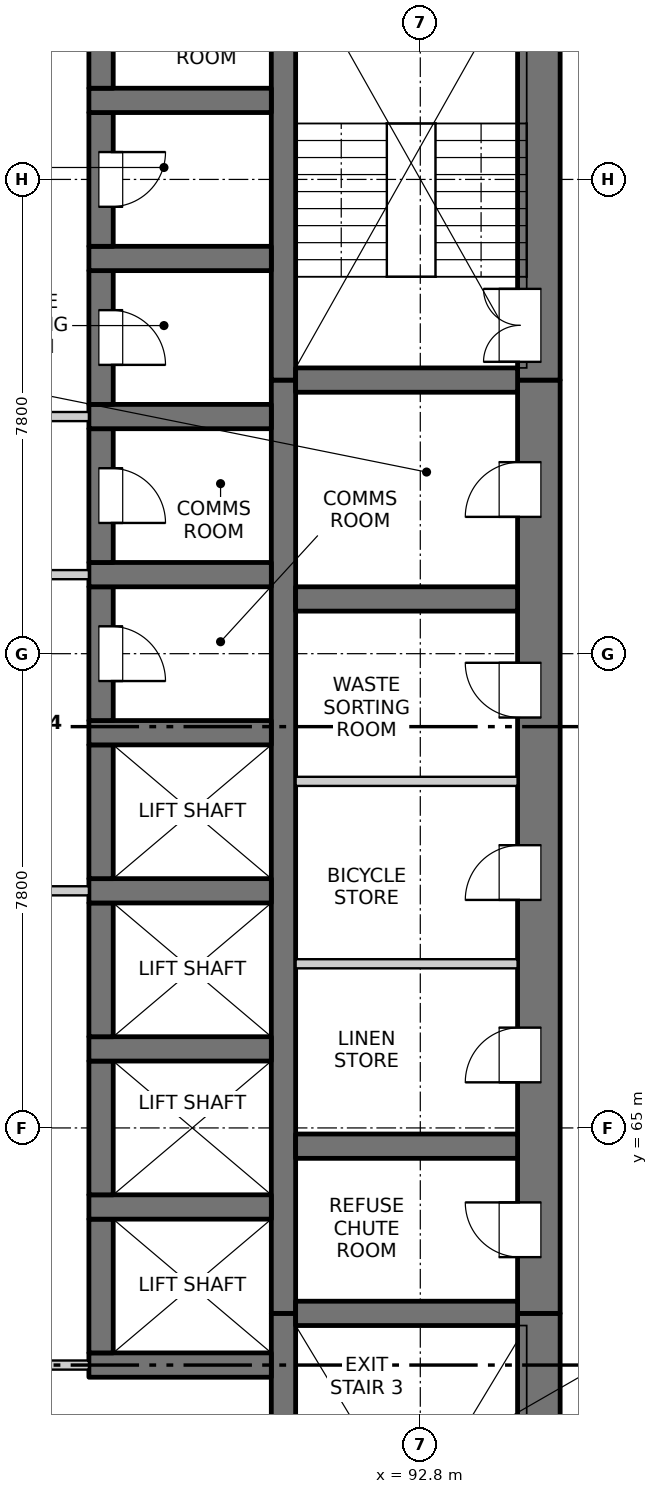
"""IFC4 building model, lengths in metres.
Left out: names, types, materials, properties, quantities, classifications, styles, units other than length and angle.
Written with IfcOpenShell. Run it as: python <this file> out.ifc"""

import sys

from ifc_helpers import new_model, si_unit, direction, frame, frame_2d, origin, place, context, subcontext, project, spatial, rectangle, extrude, element, fill, save


model = new_model("IFC4")
c1 = context("Model", 3, precision=1e-05, world=origin(), true_north=direction((0.0, 1.0)))
c2 = subcontext(c1, "Body", "Model", "MODEL_VIEW")
j1 = project(units=[si_unit("LENGTHUNIT", "METRE"), si_unit("PLANEANGLEUNIT", "RADIAN")], contexts=[c1])
p1 = place(None, origin())
s1 = spatial("IfcSite", under=j1, at=p1, CompositionType="ELEMENT")
p2 = place(p1, origin())
s2 = spatial("IfcBuilding", under=s1, at=p2, CompositionType="ELEMENT")
p3 = place(p2, frame((0.0, 0.0, 29.7)))
s3 = spatial("IfcBuildingStorey", under=s2, at=p3, CompositionType="ELEMENT", Elevation=29.7)
p4 = place(p3, frame((94.75, 54.9, -0.25), z_axis=(0.0, 0.0, 1.0), x_axis=(0.0, 1.0, 0.0)))
e1 = element("IfcWall", 1, at=p4, inside=s3, PredefinedType="SOLIDWALL", context=c2, shape_type="SweptSolid", body=[
    extrude(rectangle(XDim=7.05, YDim=0.7, at=frame_2d((3.525, 0.0))), origin(), (0.0, 0.0, 1.0), 3.4),
])
p5 = place(p4, frame((0.75, 0.0, 0.25)))
e2 = element("IfcOpeningElement", 2, at=p5, cuts=e1, PredefinedType="OPENING", context=c2, shape_type="SweptSolid", body=[
    extrude(rectangle(XDim=1.2, YDim=2.1, at=frame_2d((0.6, 1.05))), frame((0.0, 0.36, 0.0), z_axis=(0.0, -1.0, 0.0), x_axis=(1.0, 0.0, 0.0)), (0.0, 0.0, 1.0), 0.72),
])
p6 = place(p3, frame((94.75, 61.95, -0.25), z_axis=(0.0, 0.0, 1.0), x_axis=(0.0, 1.0, 0.0)))
e3 = element("IfcWall", 3, at=p6, inside=s3, PredefinedType="SOLIDWALL", context=c2, shape_type="SweptSolid", body=[
    extrude(rectangle(XDim=15.35, YDim=0.7, at=frame_2d((7.675, 0.0))), origin(), (0.0, 0.0, 1.0), 3.4),
])
p7 = place(p6, frame((0.925, 0.0, 0.25)))
e4 = element("IfcOpeningElement", 4, at=p7, cuts=e3, PredefinedType="OPENING", context=c2, shape_type="SweptSolid", body=[
    extrude(rectangle(XDim=0.9, YDim=2.1, at=frame_2d((0.45, 1.05))), frame((0.0, 0.36, 0.0), z_axis=(0.0, -1.0, 0.0), x_axis=(1.0, 0.0, 0.0)), (0.0, 0.0, 1.0), 0.72),
])
p8 = place(p6, frame((3.8, 0.0, 0.25)))
e5 = element("IfcOpeningElement", 5, at=p8, cuts=e3, PredefinedType="OPENING", context=c2, shape_type="SweptSolid", body=[
    extrude(rectangle(XDim=0.9, YDim=2.1, at=frame_2d((0.45, 1.05))), frame((0.0, 0.36, 0.0), z_axis=(0.0, -1.0, 0.0), x_axis=(1.0, 0.0, 0.0)), (0.0, 0.0, 1.0), 0.72),
])
p9 = place(p6, frame((6.8, 0.0, 0.25)))
e6 = element("IfcOpeningElement", 6, at=p9, cuts=e3, PredefinedType="OPENING", context=c2, shape_type="SweptSolid", body=[
    extrude(rectangle(XDim=0.9, YDim=2.1, at=frame_2d((0.45, 1.05))), frame((0.0, 0.36, 0.0), z_axis=(0.0, -1.0, 0.0), x_axis=(1.0, 0.0, 0.0)), (0.0, 0.0, 1.0), 0.72),
])
p10 = place(p6, frame((9.8, 0.0, 0.25)))
e7 = element("IfcOpeningElement", 7, at=p10, cuts=e3, PredefinedType="OPENING", context=c2, shape_type="SweptSolid", body=[
    extrude(rectangle(XDim=0.9, YDim=2.1, at=frame_2d((0.45, 1.05))), frame((0.0, 0.36, 0.0), z_axis=(0.0, -1.0, 0.0), x_axis=(1.0, 0.0, 0.0)), (0.0, 0.0, 1.0), 0.72),
])
p11 = place(p6, frame((13.1, 0.0, 0.25)))
e8 = element("IfcOpeningElement", 8, at=p11, cuts=e3, PredefinedType="OPENING", context=c2, shape_type="SweptSolid", body=[
    extrude(rectangle(XDim=0.9, YDim=2.1, at=frame_2d((0.45, 1.05))), frame((0.0, 0.36, 0.0), z_axis=(0.0, -1.0, 0.0), x_axis=(1.0, 0.0, 0.0)), (0.0, 0.0, 1.0), 0.72),
])
p12 = place(p3, frame((94.75, 77.3, -0.25), z_axis=(0.0, 0.0, 1.0), x_axis=(0.0, 1.0, 0.0)))
e9 = element("IfcWall", 9, at=p12, inside=s3, PredefinedType="SOLIDWALL", context=c2, shape_type="SweptSolid", body=[
    extrude(rectangle(XDim=7.55, YDim=0.7, at=frame_2d((3.775, 0.0))), origin(), (0.0, 0.0, 1.0), 3.4),
])
p13 = place(p12, frame((0.3, 0.0, 0.25)))
e10 = element("IfcOpeningElement", 10, at=p13, cuts=e9, PredefinedType="OPENING", context=c2, shape_type="SweptSolid", body=[
    extrude(rectangle(XDim=1.2, YDim=2.1, at=frame_2d((0.6, 1.05))), frame((0.0, 0.36, 0.0), z_axis=(0.0, -1.0, 0.0), x_axis=(1.0, 0.0, 0.0)), (0.0, 0.0, 1.0), 0.72),
])
p14 = place(p3, frame((90.55, 55.6, -0.25), z_axis=(0.0, 0.0, 1.0), x_axis=(0.0, 1.0, 0.0)))
e11 = element("IfcWall", 11, at=p14, inside=s3, PredefinedType="SOLIDWALL", context=c2, shape_type="SweptSolid", body=[
    extrude(rectangle(XDim=6.35, YDim=0.4, at=frame_2d((3.175, 0.0))), origin(), (0.0, 0.0, 1.0), 3.4),
])
p15 = place(p3, frame((90.55, 61.95, -0.25), z_axis=(0.0, 0.0, 1.0), x_axis=(0.0, 1.0, 0.0)))
e12 = element("IfcWall", 12, at=p15, inside=s3, PredefinedType="SOLIDWALL", context=c2, shape_type="SweptSolid", body=[
    extrude(rectangle(XDim=15.35, YDim=0.4, at=frame_2d((7.675, 0.0))), origin(), (0.0, 0.0, 1.0), 3.4),
])
p16 = place(p3, frame((90.55, 77.3, -0.25), z_axis=(0.0, 0.0, 1.0), x_axis=(0.0, 1.0, 0.0)))
e13 = element("IfcWall", 13, at=p16, inside=s3, PredefinedType="SOLIDWALL", context=c2, shape_type="SweptSolid", body=[
    extrude(rectangle(XDim=6.85, YDim=0.4, at=frame_2d((3.425, 0.0))), origin(), (0.0, 0.0, 1.0), 3.4),
])
p17 = place(p3, frame((87.35, 61.1, -0.25), z_axis=(0.0, 0.0, 1.0), x_axis=(1.0, 0.0, 0.0)))
e14 = element("IfcWall", 14, at=p17, inside=s3, PredefinedType="SOLIDWALL", context=c2, shape_type="SweptSolid", body=[
    extrude(rectangle(XDim=3.0, YDim=0.4, at=frame_2d((1.5, 0.0))), origin(), (0.0, 0.0, 1.0), 3.4),
])
p18 = place(p3, frame((87.55, 61.3, -0.25), z_axis=(0.0, 0.0, 1.0), x_axis=(0.0, 1.0, 0.0)))
e15 = element("IfcWall", 15, at=p18, inside=s3, PredefinedType="SOLIDWALL", context=c2, shape_type="SweptSolid", body=[
    extrude(rectangle(XDim=2.2, YDim=0.4, at=frame_2d((1.1, 0.0))), origin(), (0.0, 0.0, 1.0), 3.4),
])
p19 = place(p3, frame((87.35, 63.7, -0.25), z_axis=(0.0, 0.0, 1.0), x_axis=(1.0, 0.0, 0.0)))
e16 = element("IfcWall", 16, at=p19, inside=s3, PredefinedType="SOLIDWALL", context=c2, shape_type="SweptSolid", body=[
    extrude(rectangle(XDim=3.0, YDim=0.4, at=frame_2d((1.5, 0.0))), origin(), (0.0, 0.0, 1.0), 3.4),
])
p20 = place(p3, frame((87.55, 63.9, -0.25), z_axis=(0.0, 0.0, 1.0), x_axis=(0.0, 1.0, 0.0)))
e17 = element("IfcWall", 17, at=p20, inside=s3, PredefinedType="SOLIDWALL", context=c2, shape_type="SweptSolid", body=[
    extrude(rectangle(XDim=2.2, YDim=0.4, at=frame_2d((1.1, 0.0))), origin(), (0.0, 0.0, 1.0), 3.4),
])
p21 = place(p3, frame((87.35, 66.3, -0.25), z_axis=(0.0, 0.0, 1.0), x_axis=(1.0, 0.0, 0.0)))
e18 = element("IfcWall", 18, at=p21, inside=s3, PredefinedType="SOLIDWALL", context=c2, shape_type="SweptSolid", body=[
    extrude(rectangle(XDim=3.0, YDim=0.4, at=frame_2d((1.5, 0.0))), origin(), (0.0, 0.0, 1.0), 3.4),
])
p22 = place(p3, frame((87.55, 66.5, -0.25), z_axis=(0.0, 0.0, 1.0), x_axis=(0.0, 1.0, 0.0)))
e19 = element("IfcWall", 19, at=p22, inside=s3, PredefinedType="SOLIDWALL", context=c2, shape_type="SweptSolid", body=[
    extrude(rectangle(XDim=2.2, YDim=0.4, at=frame_2d((1.1, 0.0))), origin(), (0.0, 0.0, 1.0), 3.4),
])
p23 = place(p3, frame((87.35, 68.9, -0.25), z_axis=(0.0, 0.0, 1.0), x_axis=(1.0, 0.0, 0.0)))
e20 = element("IfcWall", 20, at=p23, inside=s3, PredefinedType="SOLIDWALL", context=c2, shape_type="SweptSolid", body=[
    extrude(rectangle(XDim=3.0, YDim=0.4, at=frame_2d((1.5, 0.0))), origin(), (0.0, 0.0, 1.0), 3.4),
])
p24 = place(p3, frame((87.55, 69.1, -0.25), z_axis=(0.0, 0.0, 1.0), x_axis=(0.0, 1.0, 0.0)))
e21 = element("IfcWall", 21, at=p24, inside=s3, PredefinedType="SOLIDWALL", context=c2, shape_type="SweptSolid", body=[
    extrude(rectangle(XDim=2.2, YDim=0.4, at=frame_2d((1.1, 0.0))), origin(), (0.0, 0.0, 1.0), 3.4),
])
p25 = place(p3, frame((87.35, 71.5, -0.25), z_axis=(0.0, 0.0, 1.0), x_axis=(1.0, 0.0, 0.0)))
e22 = element("IfcWall", 22, at=p25, inside=s3, PredefinedType="SOLIDWALL", context=c2, shape_type="SweptSolid", body=[
    extrude(rectangle(XDim=3.0, YDim=0.4, at=frame_2d((1.5, 0.0))), origin(), (0.0, 0.0, 1.0), 3.4),
])
p26 = place(p3, frame((87.55, 71.7, -0.25), z_axis=(0.0, 0.0, 1.0), x_axis=(0.0, 1.0, 0.0)))
e23 = element("IfcWall", 23, at=p26, inside=s3, PredefinedType="SOLIDWALL", context=c2, shape_type="SweptSolid", body=[
    extrude(rectangle(XDim=2.2, YDim=0.4, at=frame_2d((1.1, 0.0))), origin(), (0.0, 0.0, 1.0), 3.4),
])
p27 = place(p26, frame((0.65, 0.0, 0.25)))
e24 = element("IfcOpeningElement", 24, at=p27, cuts=e23, PredefinedType="OPENING", context=c2, shape_type="SweptSolid", body=[
    extrude(rectangle(XDim=0.9, YDim=2.1, at=frame_2d((0.45, 1.05))), frame((0.0, 0.21, 0.0), z_axis=(0.0, -1.0, 0.0), x_axis=(1.0, 0.0, 0.0)), (0.0, 0.0, 1.0), 0.42),
])
p28 = place(p3, frame((87.35, 74.1, -0.25), z_axis=(0.0, 0.0, 1.0), x_axis=(1.0, 0.0, 0.0)))
e25 = element("IfcWall", 25, at=p28, inside=s3, PredefinedType="SOLIDWALL", context=c2, shape_type="SweptSolid", body=[
    extrude(rectangle(XDim=3.0, YDim=0.4, at=frame_2d((1.5, 0.0))), origin(), (0.0, 0.0, 1.0), 3.4),
])
p29 = place(p3, frame((87.55, 74.3, -0.25), z_axis=(0.0, 0.0, 1.0), x_axis=(0.0, 1.0, 0.0)))
e26 = element("IfcWall", 26, at=p29, inside=s3, PredefinedType="SOLIDWALL", context=c2, shape_type="SweptSolid", body=[
    extrude(rectangle(XDim=2.2, YDim=0.4, at=frame_2d((1.1, 0.0))), origin(), (0.0, 0.0, 1.0), 3.4),
])
p30 = place(p29, frame((0.65, 0.0, 0.25)))
e27 = element("IfcOpeningElement", 27, at=p30, cuts=e26, PredefinedType="OPENING", context=c2, shape_type="SweptSolid", body=[
    extrude(rectangle(XDim=0.9, YDim=2.1, at=frame_2d((0.45, 1.05))), frame((0.0, 0.21, 0.0), z_axis=(0.0, -1.0, 0.0), x_axis=(1.0, 0.0, 0.0)), (0.0, 0.0, 1.0), 0.42),
])
p31 = place(p3, frame((87.35, 76.7, -0.25), z_axis=(0.0, 0.0, 1.0), x_axis=(1.0, 0.0, 0.0)))
e28 = element("IfcWall", 28, at=p31, inside=s3, PredefinedType="SOLIDWALL", context=c2, shape_type="SweptSolid", body=[
    extrude(rectangle(XDim=3.0, YDim=0.4, at=frame_2d((1.5, 0.0))), origin(), (0.0, 0.0, 1.0), 3.4),
])
p32 = place(p3, frame((87.55, 76.9, -0.25), z_axis=(0.0, 0.0, 1.0), x_axis=(0.0, 1.0, 0.0)))
e29 = element("IfcWall", 29, at=p32, inside=s3, PredefinedType="SOLIDWALL", context=c2, shape_type="SweptSolid", body=[
    extrude(rectangle(XDim=2.2, YDim=0.4, at=frame_2d((1.1, 0.0))), origin(), (0.0, 0.0, 1.0), 3.4),
])
p33 = place(p32, frame((0.65, 0.0, 0.25)))
e30 = element("IfcOpeningElement", 30, at=p33, cuts=e29, PredefinedType="OPENING", context=c2, shape_type="SweptSolid", body=[
    extrude(rectangle(XDim=0.9, YDim=2.1, at=frame_2d((0.45, 1.05))), frame((0.0, 0.21, 0.0), z_axis=(0.0, -1.0, 0.0), x_axis=(1.0, 0.0, 0.0)), (0.0, 0.0, 1.0), 0.42),
])
p34 = place(p3, frame((87.35, 79.3, -0.25), z_axis=(0.0, 0.0, 1.0), x_axis=(1.0, 0.0, 0.0)))
e31 = element("IfcWall", 31, at=p34, inside=s3, PredefinedType="SOLIDWALL", context=c2, shape_type="SweptSolid", body=[
    extrude(rectangle(XDim=3.0, YDim=0.4, at=frame_2d((1.5, 0.0))), origin(), (0.0, 0.0, 1.0), 3.4),
])
p35 = place(p3, frame((87.55, 79.5, -0.25), z_axis=(0.0, 0.0, 1.0), x_axis=(0.0, 1.0, 0.0)))
e32 = element("IfcWall", 32, at=p35, inside=s3, PredefinedType="SOLIDWALL", context=c2, shape_type="SweptSolid", body=[
    extrude(rectangle(XDim=2.2, YDim=0.4, at=frame_2d((1.1, 0.0))), origin(), (0.0, 0.0, 1.0), 3.4),
])
p36 = place(p35, frame((0.65, 0.0, 0.25)))
e33 = element("IfcOpeningElement", 33, at=p36, cuts=e32, PredefinedType="OPENING", context=c2, shape_type="SweptSolid", body=[
    extrude(rectangle(XDim=0.9, YDim=2.1, at=frame_2d((0.45, 1.05))), frame((0.0, 0.21, 0.0), z_axis=(0.0, -1.0, 0.0), x_axis=(1.0, 0.0, 0.0)), (0.0, 0.0, 1.0), 0.42),
])
p37 = place(p3, frame((87.35, 81.9, -0.25), z_axis=(0.0, 0.0, 1.0), x_axis=(1.0, 0.0, 0.0)))
e34 = element("IfcWall", 34, at=p37, inside=s3, PredefinedType="SOLIDWALL", context=c2, shape_type="SweptSolid", body=[
    extrude(rectangle(XDim=3.0, YDim=0.4, at=frame_2d((1.5, 0.0))), origin(), (0.0, 0.0, 1.0), 3.4),
])
p38 = place(p3, frame((87.55, 82.1, -0.25), z_axis=(0.0, 0.0, 1.0), x_axis=(0.0, 1.0, 0.0)))
e35 = element("IfcWall", 35, at=p38, inside=s3, PredefinedType="SOLIDWALL", context=c2, shape_type="SweptSolid", body=[
    extrude(rectangle(XDim=2.05, YDim=0.4, at=frame_2d((1.025, 0.0))), origin(), (0.0, 0.0, 1.0), 3.4),
])
p39 = place(p38, frame((0.65, 0.0, 0.25)))
e36 = element("IfcOpeningElement", 36, at=p39, cuts=e35, PredefinedType="OPENING", context=c2, shape_type="SweptSolid", body=[
    extrude(rectangle(XDim=0.9, YDim=2.1, at=frame_2d((0.45, 1.05))), frame((0.0, 0.21, 0.0), z_axis=(0.0, -1.0, 0.0), x_axis=(1.0, 0.0, 0.0)), (0.0, 0.0, 1.0), 0.42),
])
for number, where, z_axis, x_axis in (
    (37, (90.75, 61.95, -0.25), (0.0, 0.0, 1.0), (1.0, 0.0, 0.0)),
    (38, (90.75, 64.7, -0.25), (0.0, 0.0, 1.0), (1.0, 0.0, 0.0)),
    (39, (90.75, 73.7, -0.25), (0.0, 0.0, 1.0), (1.0, 0.0, 0.0)),
    (40, (90.75, 77.3, -0.25), (0.0, 0.0, 1.0), (1.0, 0.0, 0.0)),
):
    element("IfcWall", number, at=place(p3, frame(where, z_axis=z_axis, x_axis=x_axis)), inside=s3, PredefinedType="SOLIDWALL", context=c2, shape_type="SweptSolid", body=[
        extrude(rectangle(XDim=3.65, YDim=0.4, at=frame_2d((1.825, 0.0))), origin(), (0.0, 0.0, 1.0), 3.4),
    ])
p40 = place(p3, frame((82.65, 61.1, 0.0), z_axis=(0.0, 0.0, 1.0), x_axis=(1.0, 0.0, 0.0)))
e41 = element("IfcWall", 41, at=p40, inside=s3, PredefinedType="PARTITIONING", context=c2, shape_type="SweptSolid", body=[
    extrude(rectangle(XDim=4.7, YDim=0.15, at=frame_2d((2.35, 0.0))), origin(), (0.0, 0.0, 1.0), 3.15),
])
p41 = place(p40, frame((1.45, 0.0, 0.0)))
e42 = element("IfcOpeningElement", 42, at=p41, cuts=e41, PredefinedType="OPENING", context=c2, shape_type="SweptSolid", body=[
    extrude(rectangle(XDim=1.8, YDim=2.1, at=frame_2d((0.9, 1.05))), frame((0.0, 0.085, 0.0), z_axis=(0.0, -1.0, 0.0), x_axis=(1.0, 0.0, 0.0)), (0.0, 0.0, 1.0), 0.17),
])
p42 = place(p3, frame((90.75, 67.7, 0.0), z_axis=(0.0, 0.0, 1.0), x_axis=(1.0, 0.0, 0.0)))
e43 = element("IfcWall", 43, at=p42, inside=s3, PredefinedType="PARTITIONING", context=c2, shape_type="SweptSolid", body=[
    extrude(rectangle(XDim=3.65, YDim=0.15, at=frame_2d((1.825, 0.0))), origin(), (0.0, 0.0, 1.0), 3.15),
])
p43 = place(p3, frame((82.65, 68.9, 0.0), z_axis=(0.0, 0.0, 1.0), x_axis=(1.0, 0.0, 0.0)))
e44 = element("IfcWall", 44, at=p43, inside=s3, PredefinedType="PARTITIONING", context=c2, shape_type="SweptSolid", body=[
    extrude(rectangle(XDim=4.7, YDim=0.15, at=frame_2d((2.35, 0.0))), origin(), (0.0, 0.0, 1.0), 3.15),
])
p44 = place(p43, frame((1.45, 0.0, 0.0)))
e45 = element("IfcOpeningElement", 45, at=p44, cuts=e44, PredefinedType="OPENING", context=c2, shape_type="SweptSolid", body=[
    extrude(rectangle(XDim=1.8, YDim=2.1, at=frame_2d((0.9, 1.05))), frame((0.0, 0.085, 0.0), z_axis=(0.0, -1.0, 0.0), x_axis=(1.0, 0.0, 0.0)), (0.0, 0.0, 1.0), 0.17),
])
p45 = place(p3, frame((90.75, 70.7, 0.0), z_axis=(0.0, 0.0, 1.0), x_axis=(1.0, 0.0, 0.0)))
e46 = element("IfcWall", 46, at=p45, inside=s3, PredefinedType="PARTITIONING", context=c2, shape_type="SweptSolid", body=[
    extrude(rectangle(XDim=3.65, YDim=0.15, at=frame_2d((1.825, 0.0))), origin(), (0.0, 0.0, 1.0), 3.15),
])
p46 = place(p3, frame((82.65, 74.1, 0.0), z_axis=(0.0, 0.0, 1.0), x_axis=(1.0, 0.0, 0.0)))
e47 = element("IfcWall", 47, at=p46, inside=s3, PredefinedType="PARTITIONING", context=c2, shape_type="SweptSolid", body=[
    extrude(rectangle(XDim=4.7, YDim=0.15, at=frame_2d((2.35, 0.0))), origin(), (0.0, 0.0, 1.0), 3.15),
])
p47 = place(p46, frame((1.45, 0.0, 0.0)))
e48 = element("IfcOpeningElement", 48, at=p47, cuts=e47, PredefinedType="OPENING", context=c2, shape_type="SweptSolid", body=[
    extrude(rectangle(XDim=1.8, YDim=2.1, at=frame_2d((0.9, 1.05))), frame((0.0, 0.085, 0.0), z_axis=(0.0, -1.0, 0.0), x_axis=(1.0, 0.0, 0.0)), (0.0, 0.0, 1.0), 0.17),
])
p48 = place(p3, frame((82.65, 76.7, 0.0), z_axis=(0.0, 0.0, 1.0), x_axis=(1.0, 0.0, 0.0)))
e49 = element("IfcWall", 49, at=p48, inside=s3, PredefinedType="PARTITIONING", context=c2, shape_type="SweptSolid", body=[
    extrude(rectangle(XDim=4.7, YDim=0.15, at=frame_2d((2.35, 0.0))), origin(), (0.0, 0.0, 1.0), 3.15),
])
p49 = place(p48, frame((1.45, 0.0, 0.0)))
e50 = element("IfcOpeningElement", 50, at=p49, cuts=e49, PredefinedType="OPENING", context=c2, shape_type="SweptSolid", body=[
    extrude(rectangle(XDim=1.8, YDim=2.1, at=frame_2d((0.9, 1.05))), frame((0.0, 0.085, 0.0), z_axis=(0.0, -1.0, 0.0), x_axis=(1.0, 0.0, 0.0)), (0.0, 0.0, 1.0), 0.17),
])
p50 = place(p7, origin())
e51 = element("IfcDoor", 51, at=p50, inside=s3, OperationType="SINGLE_SWING_RIGHT", PredefinedType="DOOR", context=c2, shape_type="SweptSolid", body=[
    extrude(rectangle(XDim=0.9, YDim=2.1, at=frame_2d((0.45, 1.05))), frame((0.0, 0.335, 0.0), z_axis=(0.0, -1.0, 0.0), x_axis=(1.0, 0.0, 0.0)), (0.0, 0.0, 1.0), 0.05),
])
fill(e4, e51)
p51 = place(p8, origin())
e52 = element("IfcDoor", 52, at=p51, inside=s3, OperationType="SINGLE_SWING_LEFT", PredefinedType="DOOR", context=c2, shape_type="SweptSolid", body=[
    extrude(rectangle(XDim=0.9, YDim=2.1, at=frame_2d((0.45, 1.05))), frame((0.0, 0.335, 0.0), z_axis=(0.0, -1.0, 0.0), x_axis=(1.0, 0.0, 0.0)), (0.0, 0.0, 1.0), 0.05),
])
fill(e5, e52)
p52 = place(p9, origin())
e53 = element("IfcDoor", 53, at=p52, inside=s3, OperationType="SINGLE_SWING_LEFT", PredefinedType="DOOR", context=c2, shape_type="SweptSolid", body=[
    extrude(rectangle(XDim=0.9, YDim=2.1, at=frame_2d((0.45, 1.05))), frame((0.0, 0.335, 0.0), z_axis=(0.0, -1.0, 0.0), x_axis=(1.0, 0.0, 0.0)), (0.0, 0.0, 1.0), 0.05),
])
fill(e6, e53)
p53 = place(p10, origin())
e54 = element("IfcDoor", 54, at=p53, inside=s3, OperationType="SINGLE_SWING_RIGHT", PredefinedType="DOOR", context=c2, shape_type="SweptSolid", body=[
    extrude(rectangle(XDim=0.9, YDim=2.1, at=frame_2d((0.45, 1.05))), frame((0.0, 0.335, 0.0), z_axis=(0.0, -1.0, 0.0), x_axis=(1.0, 0.0, 0.0)), (0.0, 0.0, 1.0), 0.05),
])
fill(e7, e54)
p54 = place(p27, origin())
e55 = element("IfcDoor", 55, at=p54, inside=s3, OperationType="SINGLE_SWING_RIGHT", PredefinedType="DOOR", context=c2, shape_type="SweptSolid", body=[
    extrude(rectangle(XDim=0.9, YDim=2.1, at=frame_2d((0.45, 1.05))), frame((0.0, -0.135, 0.0), z_axis=(0.0, -1.0, 0.0), x_axis=(1.0, 0.0, 0.0)), (0.0, 0.0, 1.0), 0.05),
])
fill(e24, e55)
p55 = place(p30, origin())
e56 = element("IfcDoor", 56, at=p55, inside=s3, OperationType="SINGLE_SWING_RIGHT", PredefinedType="DOOR", context=c2, shape_type="SweptSolid", body=[
    extrude(rectangle(XDim=0.9, YDim=2.1, at=frame_2d((0.45, 1.05))), frame((0.0, -0.135, 0.0), z_axis=(0.0, -1.0, 0.0), x_axis=(1.0, 0.0, 0.0)), (0.0, 0.0, 1.0), 0.05),
])
fill(e27, e56)
p56 = place(p11, origin())
e57 = element("IfcDoor", 57, at=p56, inside=s3, OperationType="SINGLE_SWING_LEFT", PredefinedType="DOOR", context=c2, shape_type="SweptSolid", body=[
    extrude(rectangle(XDim=0.9, YDim=2.1, at=frame_2d((0.45, 1.05))), frame((0.0, 0.335, 0.0), z_axis=(0.0, -1.0, 0.0), x_axis=(1.0, 0.0, 0.0)), (0.0, 0.0, 1.0), 0.05),
])
fill(e8, e57)
p57 = place(p33, origin())
e58 = element("IfcDoor", 58, at=p57, inside=s3, OperationType="SINGLE_SWING_RIGHT", PredefinedType="DOOR", context=c2, shape_type="SweptSolid", body=[
    extrude(rectangle(XDim=0.9, YDim=2.1, at=frame_2d((0.45, 1.05))), frame((0.0, -0.135, 0.0), z_axis=(0.0, -1.0, 0.0), x_axis=(1.0, 0.0, 0.0)), (0.0, 0.0, 1.0), 0.05),
])
fill(e30, e58)
p58 = place(p13, origin())
e59 = element("IfcDoor", 59, at=p58, inside=s3, OperationType="DOUBLE_DOOR_SINGLE_SWING", PredefinedType="DOOR", context=c2, shape_type="SweptSolid", body=[
    extrude(rectangle(XDim=1.2, YDim=2.1, at=frame_2d((0.6, 1.05))), frame((0.0, 0.335, 0.0), z_axis=(0.0, -1.0, 0.0), x_axis=(1.0, 0.0, 0.0)), (0.0, 0.0, 1.0), 0.05),
])
fill(e10, e59)
p59 = place(p36, origin())
e60 = element("IfcDoor", 60, at=p59, inside=s3, OperationType="SINGLE_SWING_LEFT", PredefinedType="DOOR", context=c2, shape_type="SweptSolid", body=[
    extrude(rectangle(XDim=0.9, YDim=2.1, at=frame_2d((0.45, 1.05))), frame((0.0, -0.135, 0.0), z_axis=(0.0, -1.0, 0.0), x_axis=(1.0, 0.0, 0.0)), (0.0, 0.0, 1.0), 0.05),
])
fill(e33, e60)
save(model, sys.argv[1])
